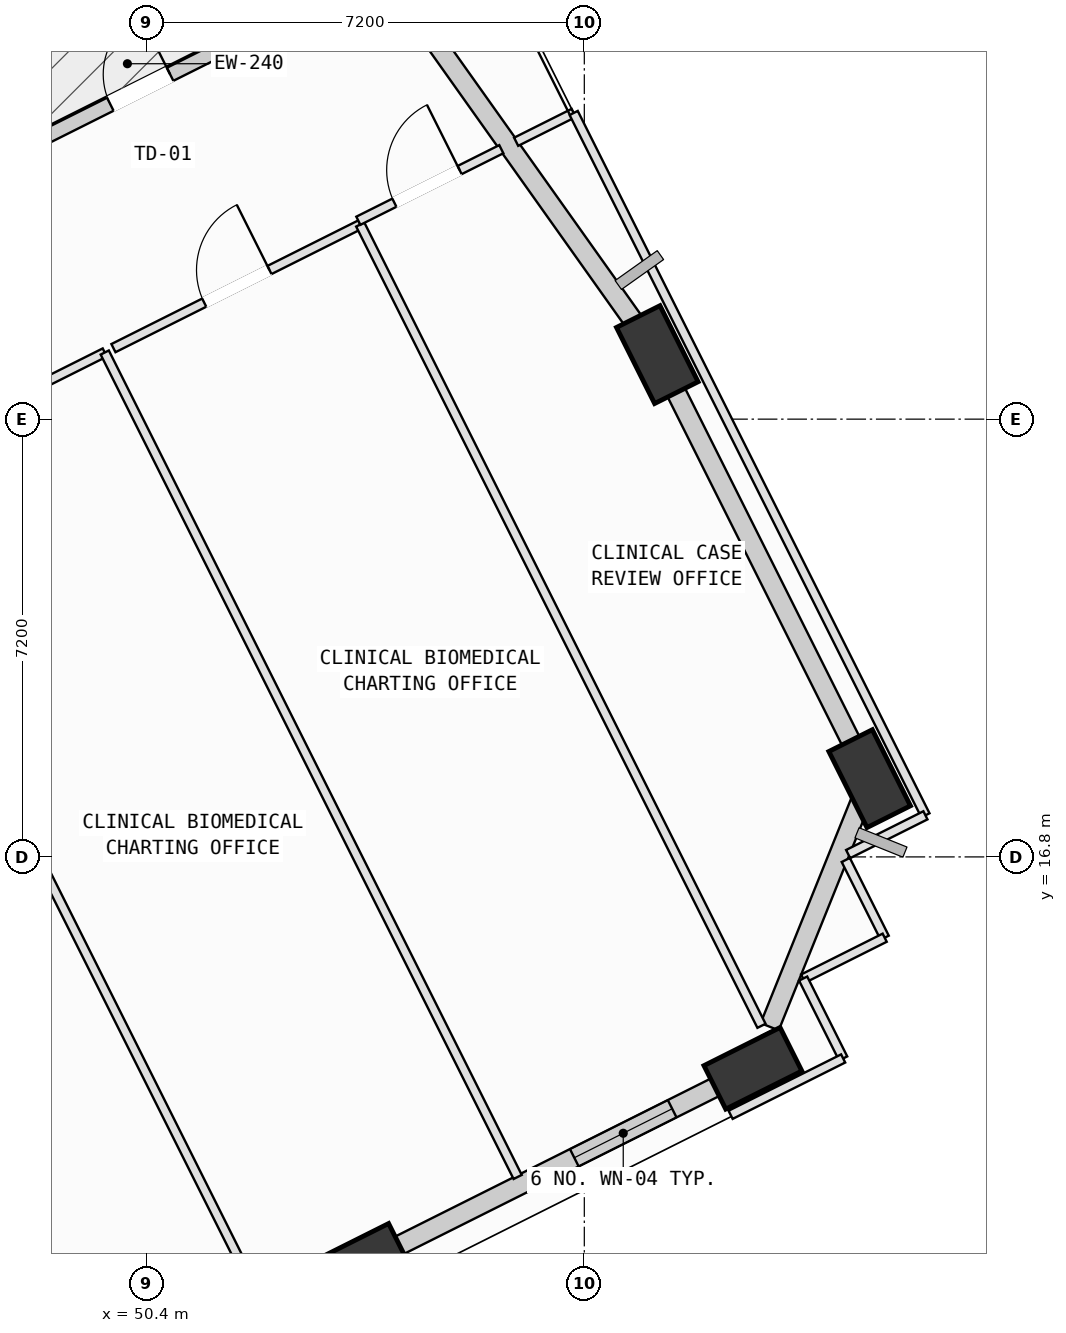
"""IFC4 building model, lengths in metres.
Left out: names, types, materials, properties, quantities, classifications, styles, units other than length and angle.
Written with IfcOpenShell. Run it as: python <this file> out.ifc"""

import sys

from ifc_helpers import new_model, si_unit, direction, frame, frame_2d, origin, origin_2d, place, context, subcontext, project, spatial, rectangle, extrude, element, fill, save


model = new_model("IFC4")
c1 = context("Model", 3, precision=1e-05, world=origin(), true_north=direction((0.0, 1.0)))
c2 = subcontext(c1, "Body", "Model", "MODEL_VIEW")
j1 = project(units=[si_unit("LENGTHUNIT", "METRE"), si_unit("PLANEANGLEUNIT", "RADIAN")], contexts=[c1])
p1 = place(None, origin())
s1 = spatial("IfcSite", under=j1, at=p1, CompositionType="ELEMENT")
p2 = place(p1, origin())
s2 = spatial("IfcBuilding", under=s1, at=p2, CompositionType="ELEMENT")
p3 = place(p2, frame((0.0, 0.0, 136.4)))
s3 = spatial("IfcBuildingStorey", under=s2, at=p3, CompositionType="ELEMENT", Elevation=136.4)
p4 = place(p3, frame((53.935, 10.099, 0.002), z_axis=(0.059912602707, 0.084339444784, 0.994634273535), x_axis=(-0.986866301457, 0.154755115005, 0.046322321071)))
e1 = element("IfcColumn", 1, at=p4, inside=s3, PredefinedType="COLUMN", context=c2, shape_type="SweptSolid", body=[
    extrude(rectangle(XDim=1.4, YDim=0.8, at=origin_2d()), origin(), (0.0, 0.0, 1.0), 4.018),
])
p5 = place(p3, frame((60.373, 13.323, 0.002), z_axis=(0.046336981836, 0.110565861109, 0.992788030987), x_axis=(-0.996481062966, -0.064374604157, 0.053678687488)))
e2 = element("IfcColumn", 2, at=p5, inside=s3, PredefinedType="COLUMN", context=c2, shape_type="SweptSolid", body=[
    extrude(rectangle(XDim=1.4, YDim=0.8, at=origin_2d()), origin(), (0.0, 0.0, 1.0), 4.025),
])
p6 = place(p3, frame((62.293, 18.087, 0.002), z_axis=(0.026621060483, 0.118309086564, 0.992619906699), x_axis=(0.241997163548, -0.964199136858, 0.108431532849)))
e3 = element("IfcColumn", 3, at=p6, inside=s3, PredefinedType="COLUMN", context=c2, shape_type="SweptSolid", body=[
    extrude(rectangle(XDim=1.4, YDim=0.8, at=origin_2d()), origin(), (0.0, 0.0, 1.0), 4.026),
])
p7 = place(p3, frame((58.8, 25.062, 0.002), z_axis=(-0.001944330539, 0.103900163198, 0.994585831221), x_axis=(0.464319911257, -0.880779809394, 0.092919036668)))
e4 = element("IfcColumn", 4, at=p7, inside=s3, PredefinedType="COLUMN", context=c2, shape_type="SweptSolid", body=[
    extrude(rectangle(XDim=1.4, YDim=0.8, at=origin_2d()), origin(), (0.0, 0.0, 1.0), 4.018),
])
p8 = place(p3, frame((47.185, 27.867, 0.0), z_axis=(0.0, 0.0, 1.0), x_axis=(0.894146388343, 0.447774760581, 0.0)))
e5 = element("IfcWall", 5, at=p8, inside=s3, PredefinedType="SOLIDWALL", context=c2, shape_type="SweptSolid", body=[
    extrude(rectangle(XDim=6.96, YDim=0.24, at=frame_2d((3.48, 0.0))), origin(), (0.0, 0.0, 1.0), 2.945),
])
p9 = place(p8, frame((2.93, 0.0, 0.0)))
e6 = element("IfcOpeningElement", 6, at=p9, cuts=e5, PredefinedType="OPENING", context=c2, shape_type="SweptSolid", body=[
    extrude(rectangle(XDim=1.1, YDim=2.15, at=frame_2d((0.55, 1.075))), frame((0.0, 0.13, 0.0), z_axis=(0.0, -1.0, 0.0), x_axis=(1.0, 0.0, 0.0)), (0.0, 0.0, 1.0), 0.26),
])
p10 = place(p3, frame((60.116, 13.194, 0.0), z_axis=(0.0, 0.0, 1.0), x_axis=(-0.894161076432, -0.447745429227, 0.0)))
e7 = element("IfcWall", 7, at=p10, inside=s3, PredefinedType="SOLIDWALL", context=c2, shape_type="SweptSolid", body=[
    extrude(rectangle(XDim=6.242, YDim=0.32, at=frame_2d((3.121, 0.0))), origin(), (0.0, 0.0, 1.0), 3.165),
])
p11 = place(p10, frame((1.198, 0.0, 0.75)))
e8 = element("IfcOpeningElement", 8, at=p11, cuts=e7, PredefinedType="OPENING", context=c2, shape_type="SweptSolid", body=[
    extrude(rectangle(XDim=1.8, YDim=2.05, at=frame_2d((0.9, 1.025))), frame((0.0, 0.17, 0.0), z_axis=(0.0, -1.0, 0.0), x_axis=(1.0, 0.0, 0.0)), (0.0, 0.0, 1.0), 0.34),
])
p12 = place(p3, frame((62.198, 17.852, 0.0), z_axis=(0.0, 0.0, 1.0), x_axis=(-0.373816351304, -0.927502741504, 0.0)))
e9 = element("IfcWall", 9, at=p12, inside=s3, PredefinedType="SOLIDWALL", context=c2, shape_type="SweptSolid", body=[
    extrude(rectangle(XDim=4.145, YDim=0.32, at=frame_2d((2.073, 0.0))), origin(), (0.0, 0.0, 1.0), 3.165),
])
p13 = place(p3, frame((58.934, 24.794, 0.0), z_axis=(0.0, 0.0, 1.0), x_axis=(0.447756031502, -0.894155767332, 0.0)))
e10 = element("IfcWall", 10, at=p13, inside=s3, PredefinedType="SOLIDWALL", context=c2, shape_type="SweptSolid", body=[
    extrude(rectangle(XDim=6.84, YDim=0.32, at=frame_2d((3.42, 0.0))), origin(), (0.0, 0.0, 1.0), 3.165),
])
p14 = place(p3, frame((53.303, 32.8, 0.0), z_axis=(0.0, 0.0, 1.0), x_axis=(0.579127420341, -0.815237039768, 0.0)))
e11 = element("IfcWall", 11, at=p14, inside=s3, PredefinedType="SOLIDWALL", context=c2, shape_type="SweptSolid", body=[
    extrude(rectangle(XDim=8.838, YDim=0.32, at=frame_2d((4.419, 0.0))), origin(), (0.0, 0.0, 1.0), 3.165),
])
p15 = place(p3, frame((45.51, 22.992, 0.0), z_axis=(0.0, 0.0, 1.0), x_axis=(0.447741560251, -0.894163013787, 0.0)))
e12 = element("IfcWall", 12, at=p15, inside=s3, PredefinedType="PARTITIONING", context=c2, shape_type="SweptSolid", body=[
    extrude(rectangle(XDim=15.165, YDim=0.15, at=frame_2d((7.583, 0.0))), origin(), (0.0, 0.0, 1.0), 3.365),
])
p16 = place(p3, frame((45.653, 23.063, 0.0), z_axis=(0.0, 0.0, 1.0), x_axis=(0.894158174305, 0.447751224815, 0.0)))
e13 = element("IfcWall", 13, at=p16, inside=s3, PredefinedType="PARTITIONING", context=c2, shape_type="SweptSolid", body=[
    extrude(rectangle(XDim=4.54, YDim=0.15, at=frame_2d((2.27, 0.0))), origin(), (0.0, 0.0, 1.0), 3.78),
])
p17 = place(p16, frame((1.67, 0.0, 0.0)))
e14 = element("IfcOpeningElement", 14, at=p17, cuts=e13, PredefinedType="OPENING", context=c2, shape_type="SweptSolid", body=[
    extrude(rectangle(XDim=1.2, YDim=2.15, at=frame_2d((0.6, 1.075))), frame((0.0, 0.085, 0.0), z_axis=(0.0, -1.0, 0.0), x_axis=(1.0, 0.0, 0.0)), (0.0, 0.0, 1.0), 0.17),
])
p18 = place(p3, frame((49.713, 25.096, 0.0), z_axis=(0.0, 0.0, 1.0), x_axis=(0.447793043956, -0.894137232076, 0.0)))
e15 = element("IfcWall", 15, at=p18, inside=s3, PredefinedType="PARTITIONING", context=c2, shape_type="SweptSolid", body=[
    extrude(rectangle(XDim=15.166, YDim=0.15, at=frame_2d((7.583, 0.0))), origin(), (0.0, 0.0, 1.0), 3.78),
])
p19 = place(p3, frame((49.856, 25.168, 0.0), z_axis=(0.0, 0.0, 1.0), x_axis=(0.894125827082, 0.447815816319, 0.0)))
e16 = element("IfcWall", 16, at=p19, inside=s3, PredefinedType="PARTITIONING", context=c2, shape_type="SweptSolid", body=[
    extrude(rectangle(XDim=4.54, YDim=0.15, at=frame_2d((2.27, 0.0))), origin(), (0.0, 0.0, 1.0), 3.78),
])
p20 = place(p19, frame((1.67, 0.0, 0.0)))
e17 = element("IfcOpeningElement", 17, at=p20, cuts=e16, PredefinedType="OPENING", context=c2, shape_type="SweptSolid", body=[
    extrude(rectangle(XDim=1.2, YDim=2.15, at=frame_2d((0.6, 1.075))), frame((0.0, 0.085, 0.0), z_axis=(0.0, -1.0, 0.0), x_axis=(1.0, 0.0, 0.0)), (0.0, 0.0, 1.0), 0.17),
])
p21 = place(p3, frame((53.915, 27.201, 0.0), z_axis=(0.0, 0.0, 1.0), x_axis=(0.447723711444, -0.894171951143, 0.0)))
e18 = element("IfcWall", 18, at=p21, inside=s3, PredefinedType="PARTITIONING", context=c2, shape_type="SweptSolid", body=[
    extrude(rectangle(XDim=14.739, YDim=0.15, at=frame_2d((7.369, 0.0))), origin(), (0.0, 0.0, 1.0), 3.78),
])
p22 = place(p3, frame((60.58, 13.891, 0.0), z_axis=(0.0, 0.0, 1.0), x_axis=(0.447516201314, -0.894275824096, 0.0)))
e19 = element("IfcWall", 19, at=p22, inside=s3, PredefinedType="PARTITIONING", context=c2, shape_type="SweptSolid", body=[
    extrude(rectangle(XDim=0.645, YDim=0.15, at=frame_2d((0.323, 0.0))), origin(), (0.0, 0.0, 1.0), 3.78),
])
p23 = place(p3, frame((60.869, 13.314, 0.0), z_axis=(0.0, 0.0, 1.0), x_axis=(-0.893889271737, -0.448287820349, 0.0)))
e20 = element("IfcWall", 20, at=p23, inside=s3, PredefinedType="PARTITIONING", context=c2, shape_type="SweptSolid", body=[
    extrude(rectangle(XDim=0.727, YDim=0.15, at=frame_2d((0.364, 0.0))), origin(), (0.0, 0.0, 1.0), 3.78),
])
p24 = place(p3, frame((61.9, 16.75, 0.0), z_axis=(0.0, 0.0, 1.0), x_axis=(0.447554947324, -0.894256433651, 0.0)))
e21 = element("IfcWall", 21, at=p24, inside=s3, PredefinedType="PARTITIONING", context=c2, shape_type="SweptSolid", body=[
    extrude(rectangle(XDim=1.43, YDim=0.15, at=frame_2d((0.715, 0.0))), origin(), (0.0, 0.0, 1.0), 3.78),
])
p25 = place(p3, frame((62.54, 15.471, 0.0), z_axis=(0.0, 0.0, 1.0), x_axis=(-0.894068821012, -0.447929618683, 0.0)))
e22 = element("IfcWall", 22, at=p25, inside=s3, PredefinedType="PARTITIONING", context=c2, shape_type="SweptSolid", body=[
    extrude(rectangle(XDim=1.5, YDim=0.15, at=frame_2d((0.75, 0.0))), origin(), (0.0, 0.0, 1.0), 3.78),
])
p26 = place(p3, frame((61.199, 14.799, 0.0), z_axis=(0.0, 0.0, 1.0), x_axis=(0.447745161959, -0.894161210265, 0.0)))
e23 = element("IfcWall", 23, at=p26, inside=s3, PredefinedType="PARTITIONING", context=c2, shape_type="SweptSolid", body=[
    extrude(rectangle(XDim=1.469, YDim=0.15, at=frame_2d((0.735, 0.0))), origin(), (0.0, 0.0, 1.0), 3.78),
])
p27 = place(p3, frame((61.857, 13.485, 0.0), z_axis=(0.0, 0.0, 1.0), x_axis=(-0.894120330837, -0.447826790158, 0.0)))
e24 = element("IfcWall", 24, at=p27, inside=s3, PredefinedType="PARTITIONING", context=c2, shape_type="SweptSolid", body=[
    extrude(rectangle(XDim=2.07, YDim=0.15, at=frame_2d((1.035, 0.0))), origin(), (0.0, 0.0, 1.0), 3.78),
])
p28 = place(p3, frame((53.884, 27.263, 0.0), z_axis=(0.0, 0.0, 1.0), x_axis=(0.894204225312, 0.447659249245, 0.0)))
e25 = element("IfcWall", 25, at=p28, inside=s3, PredefinedType="PARTITIONING", context=c2, shape_type="SweptSolid", body=[
    extrude(rectangle(XDim=2.629, YDim=0.15, at=frame_2d((1.314, 0.0))), origin(), (0.0, 0.0, 1.0), 3.78),
])
p29 = place(p28, frame((0.662, 0.0, 0.0)))
e26 = element("IfcOpeningElement", 26, at=p29, cuts=e25, PredefinedType="OPENING", context=c2, shape_type="SweptSolid", body=[
    extrude(rectangle(XDim=1.2, YDim=2.15, at=frame_2d((0.6, 1.075))), frame((0.0, 0.085, 0.0), z_axis=(0.0, -1.0, 0.0), x_axis=(1.0, 0.0, 0.0)), (0.0, 0.0, 1.0), 0.17),
])
p30 = place(p3, frame((56.479, 28.562, 0.0), z_axis=(0.0, 0.0, 1.0), x_axis=(0.894103926572, 0.447859541026, 0.0)))
e27 = element("IfcWall", 27, at=p30, inside=s3, PredefinedType="PARTITIONING", context=c2, shape_type="SweptSolid", body=[
    extrude(rectangle(XDim=1.058, YDim=0.15, at=frame_2d((0.529, 0.0))), origin(), (0.0, 0.0, 1.0), 3.78),
])
p31 = place(p3, frame((57.425, 29.036, 0.0), z_axis=(0.0, 0.0, 1.0), x_axis=(0.447765303892, -0.894151124045, 0.0)))
e28 = element("IfcWall", 28, at=p31, inside=s3, PredefinedType="PARTITIONING", context=c2, shape_type="SweptSolid", body=[
    extrude(rectangle(XDim=12.919, YDim=0.15, at=frame_2d((6.46, 0.0))), origin(), (0.0, 0.0, 1.0), 3.165),
])
p32 = place(p3, frame((63.21, 17.484, 0.0), z_axis=(0.0, 0.0, 1.0), x_axis=(-0.894014664571, -0.448037698783, 0.0)))
e29 = element("IfcWall", 29, at=p32, inside=s3, PredefinedType="PARTITIONING", context=c2, shape_type="SweptSolid", body=[
    extrude(rectangle(XDim=1.422, YDim=0.15, at=frame_2d((0.711, 0.0))), origin(), (0.0, 0.0, 1.0), 3.78),
])
p33 = place(p9, origin())
e30 = element("IfcDoor", 30, at=p33, inside=s3, OperationType="SINGLE_SWING_RIGHT", PredefinedType="DOOR", context=c2, shape_type="SweptSolid", body=[
    extrude(rectangle(XDim=1.1, YDim=2.15, at=frame_2d((0.55, 1.075))), frame((0.0, 0.025, 0.0), z_axis=(0.0, -1.0, 0.0), x_axis=(1.0, 0.0, 0.0)), (0.0, 0.0, 1.0), 0.05),
])
fill(e6, e30)
p34 = place(p11, origin())
e31 = element("IfcWindow", 31, at=p34, inside=s3, PartitioningType="SINGLE_PANEL", PredefinedType="WINDOW", context=c2, shape_type="SweptSolid", body=[
    extrude(rectangle(XDim=1.8, YDim=2.05, at=frame_2d((0.9, 1.025))), frame((0.0, 0.03, 0.0), z_axis=(0.0, -1.0, 0.0), x_axis=(1.0, 0.0, 0.0)), (0.0, 0.0, 1.0), 0.06),
])
fill(e8, e31)
p35 = place(p20, origin())
e32 = element("IfcDoor", 32, at=p35, inside=s3, OperationType="SINGLE_SWING_RIGHT", PredefinedType="DOOR", context=c2, shape_type="SweptSolid", body=[
    extrude(rectangle(XDim=1.2, YDim=2.15, at=frame_2d((0.6, 1.075))), frame((0.0, 0.025, 0.0), z_axis=(0.0, -1.0, 0.0), x_axis=(1.0, 0.0, 0.0)), (0.0, 0.0, 1.0), 0.05),
])
fill(e17, e32)
p36 = place(p29, origin())
e33 = element("IfcDoor", 33, at=p36, inside=s3, OperationType="SINGLE_SWING_RIGHT", PredefinedType="DOOR", context=c2, shape_type="SweptSolid", body=[
    extrude(rectangle(XDim=1.2, YDim=2.15, at=frame_2d((0.6, 1.075))), frame((0.0, 0.025, 0.0), z_axis=(0.0, -1.0, 0.0), x_axis=(1.0, 0.0, 0.0)), (0.0, 0.0, 1.0), 0.05),
])
fill(e26, e33)
save(model, sys.argv[1])
